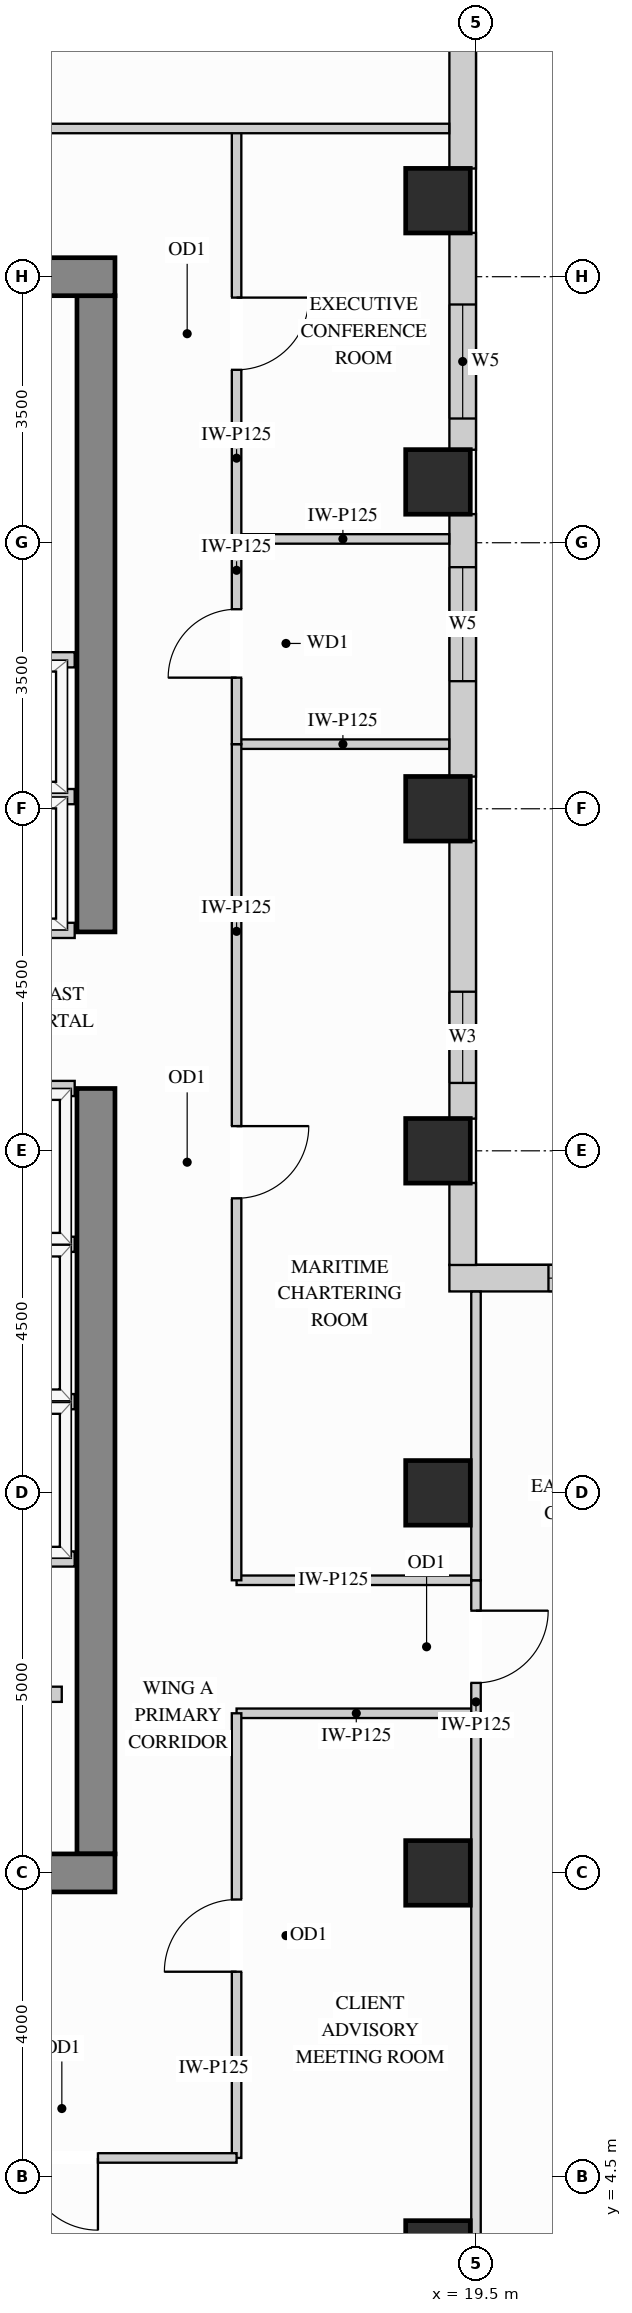
"""IFC4 building model, lengths in metres.
Left out: names, types, materials, properties, quantities, classifications, styles, units other than length and angle.
Written with IfcOpenShell. Run it as: python <this file> out.ifc"""

import sys

from ifc_helpers import new_model, si_unit, direction, frame, frame_2d, origin, origin_2d, place, context, subcontext, project, spatial, rectangle, extrude, source, transform, mapped, element, fill, save


model = new_model("IFC4")
c1 = context("Model", 3, precision=1e-05, world=origin(), true_north=direction((0.0, 1.0)))
c2 = subcontext(c1, "Body", "Model", "MODEL_VIEW")
j1 = project(units=[si_unit("LENGTHUNIT", "METRE"), si_unit("PLANEANGLEUNIT", "RADIAN")], contexts=[c1])
p1 = place(None, origin())
s1 = spatial("IfcSite", under=j1, at=p1, CompositionType="ELEMENT")
p2 = place(p1, origin())
s2 = spatial("IfcBuilding", under=s1, at=p2, CompositionType="ELEMENT")
p3 = place(p2, frame((0.0, 0.0, 262.8)))
s3 = spatial("IfcBuildingStorey", under=s2, at=p3, CompositionType="ELEMENT", Elevation=262.8)
m1 = source(origin(), c2, "Body", "SweptSolid", [
    extrude(rectangle(XDim=0.85, YDim=0.85, at=origin_2d()), origin(), (0.0, 0.0, 1.0), 3.4),
])
for number, where, z_axis, x_axis in (
    (1, (19.0, 13.5, 0.0), (0.0, 0.0, 1.0), (1.0, 0.0, 0.0)),
    (2, (19.0, 18.0, 0.0), (0.0, 0.0, 1.0), (1.0, 0.0, 0.0)),
    (3, (19.0, 22.5, 0.0), (0.0, 0.0, 1.0), (1.0, 0.0, 0.0)),
    (4, (19.0, 26.8, 0.0), (0.0, 0.0, 1.0), (1.0, 0.0, 0.0)),
    (5, (19.0, 30.5, 0.0), (0.0, 0.0, 1.0), (1.0, 0.0, 0.0)),
    (6, (19.0, 3.5, 0.0), (0.0, 0.0, 1.0), (1.0, 0.0, 0.0)),
    (7, (19.0, 8.5, 0.0), (0.0, 0.0, 1.0), (1.0, 0.0, 0.0)),
):
    element("IfcColumn", number, at=place(p3, frame(where, z_axis=z_axis, x_axis=x_axis)), inside=s3, PredefinedType="COLUMN", context=c2, shape_type="MappedRepresentation", body=[
        mapped(m1, transform((0.0, 0.0, 0.0), x_axis=(1.0, 0.0, 0.0), y_axis=(0.0, 1.0, 0.0), z_axis=(0.0, 0.0, 1.0))),
    ])
m2 = source(origin(), c2, "Body", "SweptSolid", [
    extrude(rectangle(XDim=10.07, YDim=0.5, at=frame_2d((5.035, 0.0))), origin(), (0.0, 0.0, 1.0), 3.4),
])
p4 = place(p3, frame((14.5, 8.75, 0.0), z_axis=(0.0, 0.0, 1.0), x_axis=(0.0, 1.0, 0.0)))
e8 = element("IfcWall", 8, at=p4, inside=s3, PredefinedType="SHEAR", context=c2, shape_type="MappedRepresentation", body=[
    mapped(m2, transform((0.0, 0.0, 0.0), x_axis=(1.0, 0.0, 0.0), y_axis=(0.0, 1.0, 0.0), z_axis=(0.0, 0.0, 1.0))),
])
m3 = source(origin(), c2, "Body", "SweptSolid", [
    extrude(rectangle(XDim=8.37, YDim=0.5, at=frame_2d((4.185, 0.0))), origin(), (0.0, 0.0, 1.0), 3.4),
])
p5 = place(p3, frame((14.5, 20.88, 0.0), z_axis=(0.0, 0.0, 1.0), x_axis=(0.0, 1.0, 0.0)))
e9 = element("IfcWall", 9, at=p5, inside=s3, PredefinedType="SHEAR", context=c2, shape_type="MappedRepresentation", body=[
    mapped(m3, transform((0.0, 0.0, 0.0), x_axis=(1.0, 0.0, 0.0), y_axis=(0.0, 1.0, 0.0), z_axis=(0.0, 0.0, 1.0))),
])
m4 = source(origin(), c2, "Body", "SweptSolid", [
    extrude(rectangle(XDim=10.5, YDim=0.5, at=frame_2d((5.25, 0.0))), origin(), (0.0, 0.0, 1.0), 3.4),
])
for number, where, z_axis, x_axis in (
    (10, (4.25, 29.5, 0.0), (0.0, 0.0, 1.0), (1.0, 0.0, 0.0)),
    (11, (4.25, 8.5, 0.0), (0.0, 0.0, 1.0), (1.0, 0.0, 0.0)),
):
    element("IfcWall", number, at=place(p3, frame(where, z_axis=z_axis, x_axis=x_axis)), inside=s3, PredefinedType="SHEAR", context=c2, shape_type="MappedRepresentation", body=[
        mapped(m4, transform((0.0, 0.0, 0.0), x_axis=(1.0, 0.0, 0.0), y_axis=(0.0, 1.0, 0.0), z_axis=(0.0, 0.0, 1.0))),
    ])
p6 = place(p3, frame((22.977, 16.325, 0.0), z_axis=(0.0, 0.0, 1.0), x_axis=(-1.0, 0.0, 0.0)))
e12 = element("IfcWall", 12, at=p6, inside=s3, PredefinedType="SOLIDWALL", context=c2, shape_type="SweptSolid", body=[
    extrude(rectangle(XDim=3.827, YDim=0.35, at=frame_2d((1.914, 0.0))), origin(), (0.0, 0.0, 1.0), 3.385),
])
p7 = place(p6, frame((1.023, 0.0, 0.78)))
e13 = element("IfcOpeningElement", 13, at=p7, cuts=e12, PredefinedType="OPENING", context=c2, shape_type="SweptSolid", body=[
    extrude(rectangle(XDim=1.5, YDim=2.0, at=frame_2d((0.75, 1.0))), frame((0.0, 0.185, 0.0), z_axis=(0.0, -1.0, 0.0), x_axis=(1.0, 0.0, 0.0)), (0.0, 0.0, 1.0), 0.37),
])
m5 = source(origin(), c2, "Body", "SweptSolid", [
    extrude(rectangle(XDim=1.079, YDim=0.35, at=frame_2d((0.54, 0.0))), origin(), (0.0, 0.0, 1.0), 2.619),
])
p8 = place(p3, frame((19.325, 16.498, 0.0), z_axis=(0.0, 0.0, 1.0), x_axis=(0.0, 1.0, 0.0)))
e14 = element("IfcWall", 14, at=p8, inside=s3, PredefinedType="SOLIDWALL", context=c2, shape_type="MappedRepresentation", body=[
    mapped(m5, transform((0.0, 0.0, 0.0), x_axis=(1.0, 0.0, 0.0), y_axis=(0.0, 1.0, 0.0), z_axis=(0.0, 0.0, 1.0))),
])
p9 = place(p3, frame((19.325, 18.423, 0.0), z_axis=(0.0, 0.0, 1.0), x_axis=(0.0, 1.0, 0.0)))
e15 = element("IfcWall", 15, at=p9, inside=s3, PredefinedType="SOLIDWALL", context=c2, shape_type="SweptSolid", body=[
    extrude(rectangle(XDim=3.654, YDim=0.35, at=frame_2d((1.827, 0.0))), origin(), (0.0, 0.0, 1.0), 2.619),
])
p10 = place(p9, frame((0.47, 0.0, 0.78)))
e16 = element("IfcOpeningElement", 16, at=p10, cuts=e15, PredefinedType="OPENING", context=c2, shape_type="SweptSolid", body=[
    extrude(rectangle(XDim=1.2, YDim=1.659, at=frame_2d((0.6, 0.83))), frame((0.0, 0.185, 0.0), z_axis=(0.0, -1.0, 0.0), x_axis=(1.0, 0.0, 0.0)), (0.0, 0.0, 1.0), 0.37),
])
p11 = place(p3, frame((19.325, 22.923, 0.0), z_axis=(0.0, 0.0, 1.0), x_axis=(0.0, 1.0, 0.0)))
e17 = element("IfcWall", 17, at=p11, inside=s3, PredefinedType="SOLIDWALL", context=c2, shape_type="SweptSolid", body=[
    extrude(rectangle(XDim=3.454, YDim=0.35, at=frame_2d((1.727, 0.0))), origin(), (0.0, 0.0, 1.0), 2.619),
])
p12 = place(p11, frame((1.256, 0.0, 0.78)))
e18 = element("IfcOpeningElement", 18, at=p12, cuts=e17, PredefinedType="OPENING", context=c2, shape_type="SweptSolid", body=[
    extrude(rectangle(XDim=1.5, YDim=1.659, at=frame_2d((0.75, 0.83))), frame((0.0, 0.185, 0.0), z_axis=(0.0, -1.0, 0.0), x_axis=(1.0, 0.0, 0.0)), (0.0, 0.0, 1.0), 0.37),
])
p13 = place(p3, frame((19.325, 27.223, 0.0), z_axis=(0.0, 0.0, 1.0), x_axis=(0.0, 1.0, 0.0)))
e19 = element("IfcWall", 19, at=p13, inside=s3, PredefinedType="SOLIDWALL", context=c2, shape_type="SweptSolid", body=[
    extrude(rectangle(XDim=2.854, YDim=0.35, at=frame_2d((1.427, 0.0))), origin(), (0.0, 0.0, 1.0), 2.619),
])
p14 = place(p13, frame((0.411, 0.0, 0.78)))
e20 = element("IfcOpeningElement", 20, at=p14, cuts=e19, PredefinedType="OPENING", context=c2, shape_type="SweptSolid", body=[
    extrude(rectangle(XDim=1.5, YDim=1.659, at=frame_2d((0.75, 0.83))), frame((0.0, 0.185, 0.0), z_axis=(0.0, -1.0, 0.0), x_axis=(1.0, 0.0, 0.0)), (0.0, 0.0, 1.0), 0.37),
])
m6 = source(origin(), c2, "Body", "SweptSolid", [
    extrude(rectangle(XDim=3.654, YDim=0.35, at=frame_2d((1.827, 0.0))), origin(), (0.0, 0.0, 1.0), 2.619),
])
p15 = place(p3, frame((19.325, 30.923, 0.0), z_axis=(0.0, 0.0, 1.0), x_axis=(0.0, 1.0, 0.0)))
e21 = element("IfcWall", 21, at=p15, inside=s3, PredefinedType="SOLIDWALL", context=c2, shape_type="MappedRepresentation", body=[
    mapped(m6, transform((0.0, 0.0, 0.0), x_axis=(1.0, 0.0, 0.0), y_axis=(0.0, 1.0, 0.0), z_axis=(0.0, 0.0, 1.0))),
])
m7 = source(origin(), c2, "Body", "SweptSolid", [
    extrude(rectangle(XDim=2.798, YDim=0.125, at=frame_2d((1.399, 0.0))), origin(), (0.0, 0.0, 1.0), 3.385),
])
for number, where, z_axis, x_axis in (
    (22, (16.35, 23.35, 0.0), (0.0, 0.0, 1.0), (1.0, 0.0, 0.0)),
    (23, (16.35, 26.05, 0.0), (0.0, 0.0, 1.0), (1.0, 0.0, 0.0)),
):
    element("IfcWall", number, at=place(p3, frame(where, z_axis=z_axis, x_axis=x_axis)), inside=s3, PredefinedType="PARTITIONING", context=c2, shape_type="MappedRepresentation", body=[
        mapped(m7, transform((0.0, 0.0, 0.0), x_axis=(1.0, 0.0, 0.0), y_axis=(0.0, 1.0, 0.0), z_axis=(0.0, 0.0, 1.0))),
    ])
m8 = source(origin(), c2, "Body", "SweptSolid", [
    extrude(rectangle(XDim=3.15, YDim=0.125, at=frame_2d((1.575, 0.0))), origin(), (0.0, 0.0, 1.0), 3.385),
])
for number, where, z_axis, x_axis in (
    (24, (16.35, 12.35, 0.0), (0.0, 0.0, 1.0), (1.0, 0.0, 0.0)),
    (25, (16.35, 10.6, 0.0), (0.0, 0.0, 1.0), (1.0, 0.0, 0.0)),
):
    element("IfcWall", number, at=place(p3, frame(where, z_axis=z_axis, x_axis=x_axis)), inside=s3, PredefinedType="PARTITIONING", context=c2, shape_type="MappedRepresentation", body=[
        mapped(m8, transform((0.0, 0.0, 0.0), x_axis=(1.0, 0.0, 0.0), y_axis=(0.0, 1.0, 0.0), z_axis=(0.0, 0.0, 1.0))),
    ])
p16 = place(p3, frame((16.35, 4.75, 0.0), z_axis=(0.0, 0.0, 1.0), x_axis=(0.0, 1.0, 0.0)))
e26 = element("IfcWall", 26, at=p16, inside=s3, PredefinedType="PARTITIONING", context=c2, shape_type="SweptSolid", body=[
    extrude(rectangle(XDim=5.85, YDim=0.125, at=frame_2d((2.925, 0.0))), origin(), (0.0, 0.0, 1.0), 3.385),
])
p17 = place(p16, frame((2.45, 0.0, 0.0)))
e27 = element("IfcOpeningElement", 27, at=p17, cuts=e26, PredefinedType="OPENING", context=c2, shape_type="SweptSolid", body=[
    extrude(rectangle(XDim=0.95, YDim=2.15, at=frame_2d((0.475, 1.075))), frame((0.0, 0.073, 0.0), z_axis=(0.0, -1.0, 0.0), x_axis=(1.0, 0.0, 0.0)), (0.0, 0.0, 1.0), 0.145),
])
p18 = place(p3, frame((16.35, 12.35, 0.0), z_axis=(0.0, 0.0, 1.0), x_axis=(0.0, 1.0, 0.0)))
e28 = element("IfcWall", 28, at=p18, inside=s3, PredefinedType="PARTITIONING", context=c2, shape_type="SweptSolid", body=[
    extrude(rectangle(XDim=11.0, YDim=0.125, at=frame_2d((5.5, 0.0))), origin(), (0.0, 0.0, 1.0), 3.385),
])
p19 = place(p18, frame((5.025, 0.0, 0.0)))
e29 = element("IfcOpeningElement", 29, at=p19, cuts=e28, PredefinedType="OPENING", context=c2, shape_type="SweptSolid", body=[
    extrude(rectangle(XDim=0.95, YDim=2.15, at=frame_2d((0.475, 1.075))), frame((0.0, 0.073, 0.0), z_axis=(0.0, -1.0, 0.0), x_axis=(1.0, 0.0, 0.0)), (0.0, 0.0, 1.0), 0.145),
])
p20 = place(p3, frame((16.35, 26.05, 0.0), z_axis=(0.0, 0.0, 1.0), x_axis=(0.0, 1.0, 0.0)))
e30 = element("IfcWall", 30, at=p20, inside=s3, PredefinedType="PARTITIONING", context=c2, shape_type="SweptSolid", body=[
    extrude(rectangle(XDim=5.4, YDim=0.125, at=frame_2d((2.7, 0.0))), origin(), (0.0, 0.0, 1.0), 3.385),
])
p21 = place(p20, frame((2.225, 0.0, 0.0)))
e31 = element("IfcOpeningElement", 31, at=p21, cuts=e30, PredefinedType="OPENING", context=c2, shape_type="SweptSolid", body=[
    extrude(rectangle(XDim=0.95, YDim=2.15, at=frame_2d((0.475, 1.075))), frame((0.0, 0.073, 0.0), z_axis=(0.0, -1.0, 0.0), x_axis=(1.0, 0.0, 0.0)), (0.0, 0.0, 1.0), 0.145),
])
p22 = place(p3, frame((16.35, 23.35, 0.0), z_axis=(0.0, 0.0, 1.0), x_axis=(0.0, 1.0, 0.0)))
e32 = element("IfcWall", 32, at=p22, inside=s3, PredefinedType="PARTITIONING", context=c2, shape_type="SweptSolid", body=[
    extrude(rectangle(XDim=2.7, YDim=0.125, at=frame_2d((1.35, 0.0))), origin(), (0.0, 0.0, 1.0), 3.385),
])
p23 = place(p22, frame((0.875, 0.0, 0.0)))
e33 = element("IfcOpeningElement", 33, at=p23, cuts=e32, PredefinedType="OPENING", context=c2, shape_type="SweptSolid", body=[
    extrude(rectangle(XDim=0.9, YDim=2.15, at=frame_2d((0.45, 1.075))), frame((0.0, 0.073, 0.0), z_axis=(0.0, -1.0, 0.0), x_axis=(1.0, 0.0, 0.0)), (0.0, 0.0, 1.0), 0.145),
])
m9 = source(origin(), c2, "Body", "SweptSolid", [
    extrude(rectangle(XDim=12.598, YDim=0.125, at=frame_2d((6.299, 0.0))), origin(), (0.0, 0.0, 1.0), 3.385),
])
p24 = place(p3, frame((6.55, 31.45, 0.0), z_axis=(0.0, 0.0, 1.0), x_axis=(1.0, 0.0, 0.0)))
e34 = element("IfcWall", 34, at=p24, inside=s3, PredefinedType="PARTITIONING", context=c2, shape_type="MappedRepresentation", body=[
    mapped(m9, transform((0.0, 0.0, 0.0), x_axis=(1.0, 0.0, 0.0), y_axis=(0.0, 1.0, 0.0), z_axis=(0.0, 0.0, 1.0))),
])
p25 = place(p3, frame((19.5, 10.6, 0.0), z_axis=(0.0, 0.0, 1.0), x_axis=(0.0, 1.0, 0.0)))
e35 = element("IfcWall", 35, at=p25, inside=s3, PredefinedType="PARTITIONING", context=c2, shape_type="SweptSolid", body=[
    extrude(rectangle(XDim=1.75, YDim=0.125, at=frame_2d((0.875, 0.0))), origin(), (0.0, 0.0, 1.0), 3.385),
])
p26 = place(p25, frame((0.4, 0.0, 0.0)))
e36 = element("IfcOpeningElement", 36, at=p26, cuts=e35, PredefinedType="OPENING", context=c2, shape_type="SweptSolid", body=[
    extrude(rectangle(XDim=0.95, YDim=2.15, at=frame_2d((0.475, 1.075))), frame((0.0, 0.073, 0.0), z_axis=(0.0, -1.0, 0.0), x_axis=(1.0, 0.0, 0.0)), (0.0, 0.0, 1.0), 0.145),
])
m10 = source(origin(), c2, "Body", "SweptSolid", [
    extrude(rectangle(XDim=10.248, YDim=0.125, at=frame_2d((5.124, 0.0))), origin(), (0.0, 0.0, 1.0), 3.385),
])
p27 = place(p3, frame((19.5, 0.352, 0.0), z_axis=(0.0, 0.0, 1.0), x_axis=(0.0, 1.0, 0.0)))
e37 = element("IfcWall", 37, at=p27, inside=s3, PredefinedType="PARTITIONING", context=c2, shape_type="MappedRepresentation", body=[
    mapped(m10, transform((0.0, 0.0, 0.0), x_axis=(1.0, 0.0, 0.0), y_axis=(0.0, 1.0, 0.0), z_axis=(0.0, 0.0, 1.0))),
])
m11 = source(origin(), c2, "Body", "SweptSolid", [
    extrude(rectangle(XDim=3.798, YDim=0.125, at=frame_2d((1.899, 0.0))), origin(), (0.0, 0.0, 1.0), 3.385),
])
p28 = place(p3, frame((19.5, 12.35, 0.0), z_axis=(0.0, 0.0, 1.0), x_axis=(0.0, 1.0, 0.0)))
e38 = element("IfcWall", 38, at=p28, inside=s3, PredefinedType="PARTITIONING", context=c2, shape_type="MappedRepresentation", body=[
    mapped(m11, transform((0.0, 0.0, 0.0), x_axis=(1.0, 0.0, 0.0), y_axis=(0.0, 1.0, 0.0), z_axis=(0.0, 0.0, 1.0))),
])
p29 = place(p3, frame((11.752, 4.75, 0.0), z_axis=(0.0, 0.0, 1.0), x_axis=(1.0, 0.0, 0.0)))
e39 = element("IfcWall", 39, at=p29, inside=s3, PredefinedType="PARTITIONING", context=c2, shape_type="SweptSolid", body=[
    extrude(rectangle(XDim=4.598, YDim=0.125, at=frame_2d((2.299, 0.0))), origin(), (0.0, 0.0, 1.0), 2.848),
])
p30 = place(p29, frame((1.824, 0.0, 0.0)))
e40 = element("IfcOpeningElement", 40, at=p30, cuts=e39, PredefinedType="OPENING", context=c2, shape_type="SweptSolid", body=[
    extrude(rectangle(XDim=0.95, YDim=2.15, at=frame_2d((0.475, 1.075))), frame((0.0, 0.073, 0.0), z_axis=(0.0, -1.0, 0.0), x_axis=(1.0, 0.0, 0.0)), (0.0, 0.0, 1.0), 0.145),
])
m12 = source(origin(), c2, "Body", "SweptSolid", [
    extrude(rectangle(XDim=1.63, YDim=0.2, at=frame_2d((0.815, 0.0))), origin(), (0.0, 0.0, 1.0), 3.385),
])
p31 = place(p3, frame((12.42, 10.85, 0.0), z_axis=(0.0, 0.0, 1.0), x_axis=(1.0, 0.0, 0.0)))
e41 = element("IfcWall", 41, at=p31, inside=s3, PredefinedType="PARTITIONING", context=c2, shape_type="MappedRepresentation", body=[
    mapped(m12, transform((0.0, 0.0, 0.0), x_axis=(1.0, 0.0, 0.0), y_axis=(0.0, 1.0, 0.0), z_axis=(0.0, 0.0, 1.0))),
])
m13 = source(origin(), c2, "Body", "SweptSolid", [
    extrude(rectangle(XDim=2.39, YDim=0.2, at=frame_2d((1.195, 0.0))), origin(), (0.0, 0.0, 1.0), 3.385),
])
for number, where, z_axis, x_axis in (
    (42, (11.83, 22.66, 0.0), (0.0, 0.0, 1.0), (1.0, 0.0, 0.0)),
    (43, (11.83, 20.9, 0.0), (0.0, 0.0, 1.0), (1.0, 0.0, 0.0)),
    (44, (11.83, 24.46, 0.0), (0.0, 0.0, 1.0), (1.0, 0.0, 0.0)),
):
    element("IfcWall", number, at=place(p3, frame(where, z_axis=z_axis, x_axis=x_axis)), inside=s3, PredefinedType="PARTITIONING", context=c2, shape_type="MappedRepresentation", body=[
        mapped(m13, transform((0.0, 0.0, 0.0), x_axis=(1.0, 0.0, 0.0), y_axis=(0.0, 1.0, 0.0), z_axis=(0.0, 0.0, 1.0))),
    ])
m14 = source(origin(), c2, "Body", "SweptSolid", [
    extrude(rectangle(XDim=1.99, YDim=0.2, at=frame_2d((0.995, 0.0))), origin(), (0.0, 0.0, 1.0), 3.385),
])
for number, where, z_axis, x_axis in (
    (45, (12.23, 14.7, 0.0), (0.0, 0.0, 1.0), (1.0, 0.0, 0.0)),
    (46, (12.23, 12.63, 0.0), (0.0, 0.0, 1.0), (1.0, 0.0, 0.0)),
    (47, (12.23, 16.77, 0.0), (0.0, 0.0, 1.0), (1.0, 0.0, 0.0)),
    (48, (12.23, 18.82, 0.0), (0.0, 0.0, 1.0), (1.0, 0.0, 0.0)),
):
    element("IfcWall", number, at=place(p3, frame(where, z_axis=z_axis, x_axis=x_axis)), inside=s3, PredefinedType="PARTITIONING", context=c2, shape_type="MappedRepresentation", body=[
        mapped(m14, transform((0.0, 0.0, 0.0), x_axis=(1.0, 0.0, 0.0), y_axis=(0.0, 1.0, 0.0), z_axis=(0.0, 0.0, 1.0))),
    ])
m15 = source(origin(), c2, "Body", "SweptSolid", [
    extrude(rectangle(XDim=0.95, YDim=2.15, at=frame_2d((0.475, 1.075))), frame((0.0, 0.025, 0.0), z_axis=(0.0, -1.0, 0.0), x_axis=(1.0, 0.0, 0.0)), (0.0, 0.0, 1.0), 0.05),
])
p32 = place(p17, origin())
e49 = element("IfcDoor", 49, at=p32, inside=s3, OperationType="SINGLE_SWING_LEFT", PredefinedType="DOOR", context=c2, shape_type="MappedRepresentation", body=[
    mapped(m15, transform((0.0, 0.0, 0.0), x_axis=(1.0, 0.0, 0.0), y_axis=(0.0, 1.0, 0.0), z_axis=(0.0, 0.0, 1.0))),
])
fill(e27, e49)
p33 = place(p19, origin())
e50 = element("IfcDoor", 50, at=p33, inside=s3, OperationType="SINGLE_SWING_RIGHT", PredefinedType="DOOR", context=c2, shape_type="MappedRepresentation", body=[
    mapped(m15, transform((0.0, 0.0, 0.0), x_axis=(1.0, 0.0, 0.0), y_axis=(0.0, 1.0, 0.0), z_axis=(0.0, 0.0, 1.0))),
])
fill(e29, e50)
p34 = place(p21, origin())
e51 = element("IfcDoor", 51, at=p34, inside=s3, OperationType="SINGLE_SWING_RIGHT", PredefinedType="DOOR", context=c2, shape_type="MappedRepresentation", body=[
    mapped(m15, transform((0.0, 0.0, 0.0), x_axis=(1.0, 0.0, 0.0), y_axis=(0.0, 1.0, 0.0), z_axis=(0.0, 0.0, 1.0))),
])
fill(e31, e51)
p35 = place(p30, origin())
e52 = element("IfcDoor", 52, at=p35, inside=s3, OperationType="SINGLE_SWING_RIGHT", PredefinedType="DOOR", context=c2, shape_type="MappedRepresentation", body=[
    mapped(m15, transform((0.0, 0.0, 0.0), x_axis=(1.0, 0.0, 0.0), y_axis=(0.0, 1.0, 0.0), z_axis=(0.0, 0.0, 1.0))),
])
fill(e40, e52)
p36 = place(p26, origin())
e53 = element("IfcDoor", 53, at=p36, inside=s3, OperationType="SINGLE_SWING_RIGHT", PredefinedType="DOOR", context=c2, shape_type="MappedRepresentation", body=[
    mapped(m15, transform((0.0, 0.0, 0.0), x_axis=(1.0, 0.0, 0.0), y_axis=(0.0, 1.0, 0.0), z_axis=(0.0, 0.0, 1.0))),
])
fill(e36, e53)
m16 = source(origin(), c2, "Body", "SweptSolid", [
    extrude(rectangle(XDim=0.9, YDim=2.15, at=frame_2d((0.45, 1.075))), frame((0.0, 0.025, 0.0), z_axis=(0.0, -1.0, 0.0), x_axis=(1.0, 0.0, 0.0)), (0.0, 0.0, 1.0), 0.05),
])
p37 = place(p23, origin())
e54 = element("IfcDoor", 54, at=p37, inside=s3, OperationType="SINGLE_SWING_LEFT", PredefinedType="DOOR", context=c2, shape_type="MappedRepresentation", body=[
    mapped(m16, transform((0.0, 0.0, 0.0), x_axis=(1.0, 0.0, 0.0), y_axis=(0.0, 1.0, 0.0), z_axis=(0.0, 0.0, 1.0))),
])
fill(e33, e54)
m17 = source(origin(), c2, "Body", "SweptSolid", [
    extrude(rectangle(XDim=1.2, YDim=1.659, at=frame_2d((0.6, 0.83))), frame((0.0, 0.03, 0.0), z_axis=(0.0, -1.0, 0.0), x_axis=(1.0, 0.0, 0.0)), (0.0, 0.0, 1.0), 0.06),
])
p38 = place(p10, origin())
e55 = element("IfcWindow", 55, at=p38, inside=s3, PartitioningType="SINGLE_PANEL", PredefinedType="WINDOW", context=c2, shape_type="MappedRepresentation", body=[
    mapped(m17, transform((0.0, 0.0, 0.0), x_axis=(1.0, 0.0, 0.0), y_axis=(0.0, 1.0, 0.0), z_axis=(0.0, 0.0, 1.0))),
])
fill(e16, e55)
m18 = source(origin(), c2, "Body", "SweptSolid", [
    extrude(rectangle(XDim=1.5, YDim=2.0, at=frame_2d((0.75, 1.0))), frame((0.0, 0.03, 0.0), z_axis=(0.0, -1.0, 0.0), x_axis=(1.0, 0.0, 0.0)), (0.0, 0.0, 1.0), 0.06),
])
p39 = place(p7, origin())
e56 = element("IfcWindow", 56, at=p39, inside=s3, PartitioningType="SINGLE_PANEL", PredefinedType="WINDOW", context=c2, shape_type="MappedRepresentation", body=[
    mapped(m18, transform((0.0, 0.0, 0.0), x_axis=(1.0, 0.0, 0.0), y_axis=(0.0, 1.0, 0.0), z_axis=(0.0, 0.0, 1.0))),
])
fill(e13, e56)
m19 = source(origin(), c2, "Body", "SweptSolid", [
    extrude(rectangle(XDim=1.5, YDim=1.659, at=frame_2d((0.75, 0.83))), frame((0.0, 0.03, 0.0), z_axis=(0.0, -1.0, 0.0), x_axis=(1.0, 0.0, 0.0)), (0.0, 0.0, 1.0), 0.06),
])
p40 = place(p12, origin())
e57 = element("IfcWindow", 57, at=p40, inside=s3, PartitioningType="SINGLE_PANEL", PredefinedType="WINDOW", context=c2, shape_type="MappedRepresentation", body=[
    mapped(m19, transform((0.0, 0.0, 0.0), x_axis=(1.0, 0.0, 0.0), y_axis=(0.0, 1.0, 0.0), z_axis=(0.0, 0.0, 1.0))),
])
fill(e18, e57)
p41 = place(p14, origin())
e58 = element("IfcWindow", 58, at=p41, inside=s3, PartitioningType="SINGLE_PANEL", PredefinedType="WINDOW", context=c2, shape_type="MappedRepresentation", body=[
    mapped(m19, transform((0.0, 0.0, 0.0), x_axis=(1.0, 0.0, 0.0), y_axis=(0.0, 1.0, 0.0), z_axis=(0.0, 0.0, 1.0))),
])
fill(e20, e58)
save(model, sys.argv[1])
